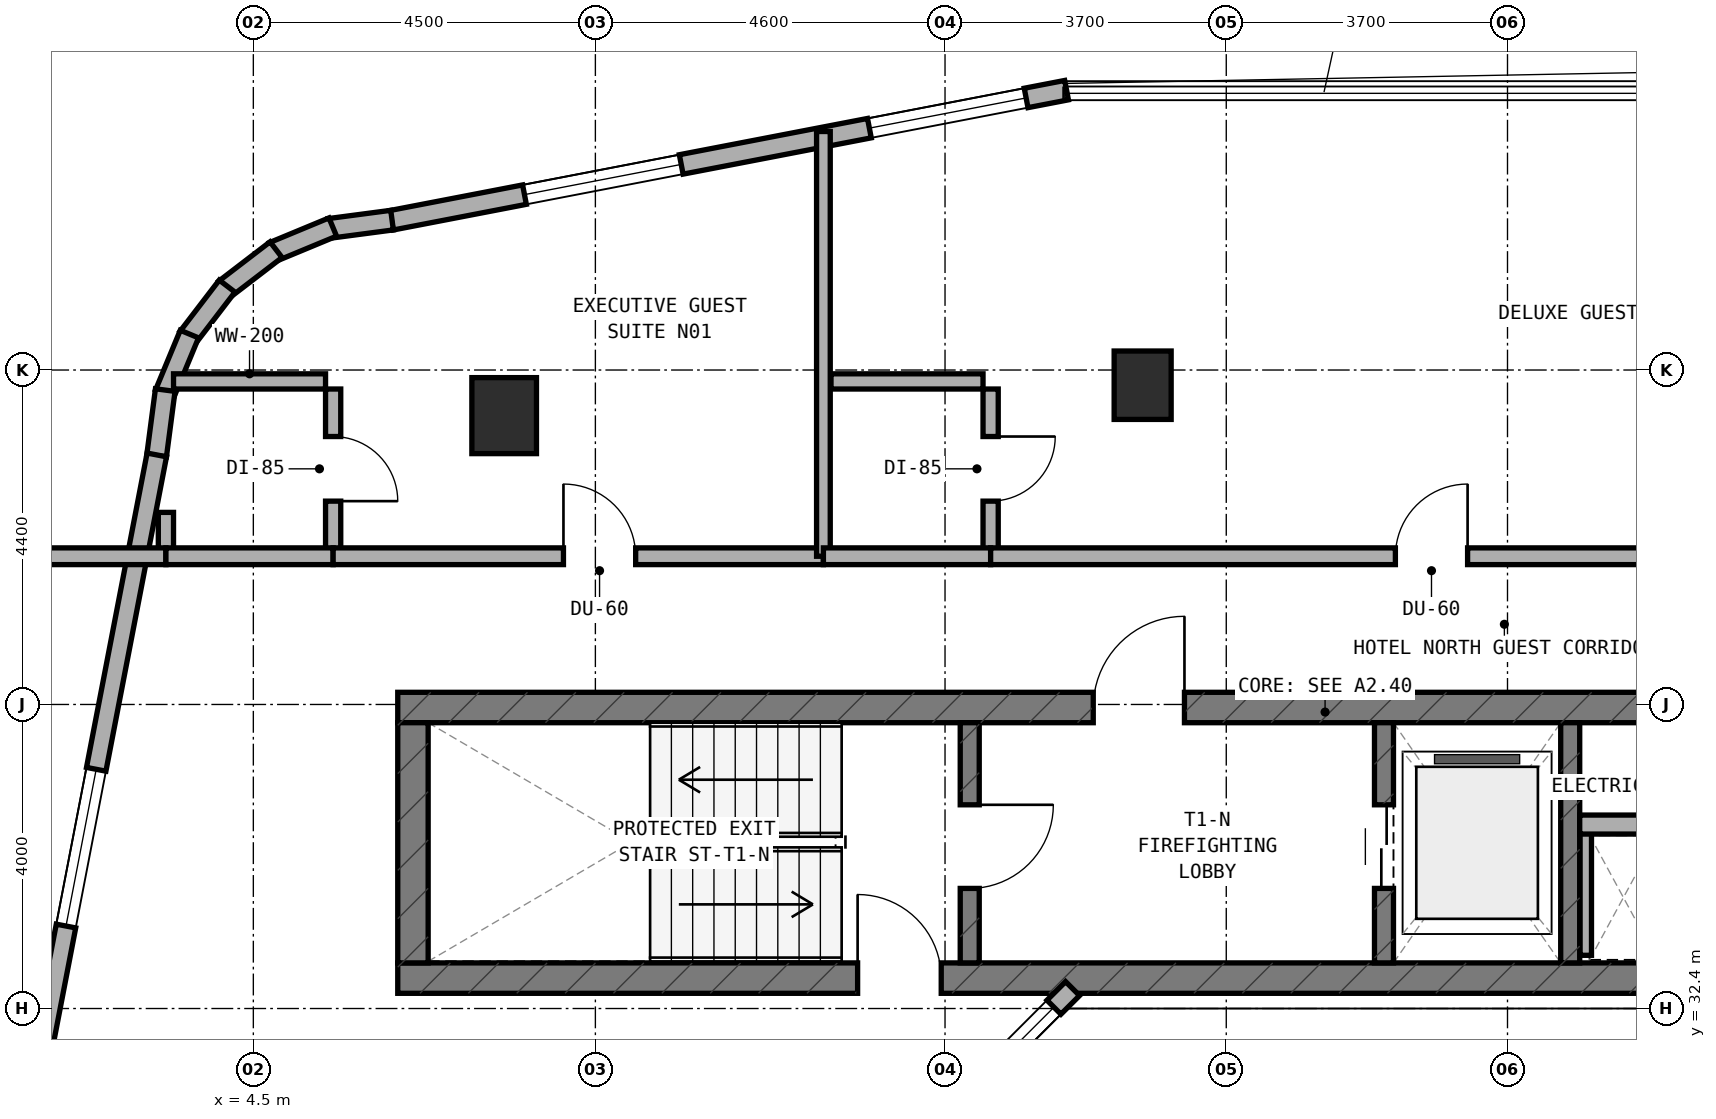
"""IFC4 building model, lengths in metres.
Left out: names, types, materials, properties, quantities, classifications, styles, units other than length and angle.
Written with IfcOpenShell. Run it as: python <this file> out.ifc"""

import sys

from ifc_helpers import new_model, si_unit, direction, frame, frame_2d, origin, origin_2d, place, context, subcontext, project, spatial, rectangle, extrude, element, fill, save


model = new_model("IFC4")
c1 = context("Model", 3, precision=1e-05, world=origin(), true_north=direction((0.0, 1.0)))
c2 = subcontext(c1, "Body", "Model", "MODEL_VIEW")
j1 = project(units=[si_unit("LENGTHUNIT", "METRE"), si_unit("PLANEANGLEUNIT", "RADIAN")], contexts=[c1])
p1 = place(None, origin())
s1 = spatial("IfcSite", under=j1, at=p1, CompositionType="ELEMENT")
p2 = place(p1, origin())
s2 = spatial("IfcBuilding", under=s1, at=p2, CompositionType="ELEMENT")
p3 = place(p2, frame((0.0, 0.0, 177.5)))
s3 = spatial("IfcBuildingStorey", under=s2, at=p3, CompositionType="ELEMENT", Elevation=177.5)
p4 = place(p3, frame((6.4, 32.8, 0.0), z_axis=(0.0, 0.0, 1.0), x_axis=(1.0, 0.0, 0.0)))
e1 = element("IfcWall", 1, at=p4, inside=s3, PredefinedType="SHEAR", context=c2, shape_type="SweptSolid", body=[
    extrude(rectangle(XDim=24.4, YDim=0.4, at=frame_2d((12.2, 0.0))), origin(), (0.0, 0.0, 1.0), 3.6),
])
p5 = place(p4, frame((6.05, 0.0, 0.0)))
e2 = element("IfcOpeningElement", 2, at=p5, cuts=e1, PredefinedType="OPENING", context=c2, shape_type="SweptSolid", body=[
    extrude(rectangle(XDim=1.1, YDim=2.15, at=frame_2d((0.55, 1.075))), frame((0.0, 0.21, 0.0), z_axis=(0.0, -1.0, 0.0), x_axis=(1.0, 0.0, 0.0)), (0.0, 0.0, 1.0), 0.42),
])
p6 = place(p3, frame((6.4, 36.36, 0.0), z_axis=(0.0, 0.0, 1.0), x_axis=(1.0, 0.0, 0.0)))
e3 = element("IfcWall", 3, at=p6, inside=s3, PredefinedType="SHEAR", context=c2, shape_type="SweptSolid", body=[
    extrude(rectangle(XDim=24.4, YDim=0.4, at=frame_2d((12.2, 0.0))), origin(), (0.0, 0.0, 1.0), 3.6),
])
p7 = place(p6, frame((9.15, 0.0, 0.0)))
e4 = element("IfcOpeningElement", 4, at=p7, cuts=e3, PredefinedType="OPENING", context=c2, shape_type="SweptSolid", body=[
    extrude(rectangle(XDim=1.2, YDim=2.15, at=frame_2d((0.6, 1.075))), frame((0.0, 0.21, 0.0), z_axis=(0.0, -1.0, 0.0), x_axis=(1.0, 0.0, 0.0)), (0.0, 0.0, 1.0), 0.42),
])
p8 = place(p6, frame((19.2, 0.0, 0.0)))
e5 = element("IfcOpeningElement", 5, at=p8, cuts=e3, PredefinedType="OPENING", context=c2, shape_type="SweptSolid", body=[
    extrude(rectangle(XDim=0.85, YDim=2.1, at=frame_2d((0.425, 1.05))), frame((0.0, 0.21, 0.0), z_axis=(0.0, -1.0, 0.0), x_axis=(1.0, 0.0, 0.0)), (0.0, 0.0, 1.0), 0.42),
])
p9 = place(p6, frame((16.94, 0.0, 0.0)))
e6 = element("IfcOpeningElement", 6, at=p9, cuts=e3, PredefinedType="OPENING", context=c2, shape_type="SweptSolid", body=[
    extrude(rectangle(XDim=0.85, YDim=2.1, at=frame_2d((0.425, 1.05))), frame((0.0, 0.21, 0.0), z_axis=(0.0, -1.0, 0.0), x_axis=(1.0, 0.0, 0.0)), (0.0, 0.0, 1.0), 0.42),
])
p10 = place(p3, frame((6.6, 33.0, 0.0), z_axis=(0.0, 0.0, 1.0), x_axis=(0.0, 1.0, 0.0)))
e7 = element("IfcWall", 7, at=p10, inside=s3, PredefinedType="SHEAR", context=c2, shape_type="SweptSolid", body=[
    extrude(rectangle(XDim=3.16, YDim=0.4, at=frame_2d((1.58, 0.0))), origin(), (0.0, 0.0, 1.0), 3.6),
])
p11 = place(p3, frame((13.925, 33.0, 0.0), z_axis=(0.0, 0.0, 1.0), x_axis=(0.0, 1.0, 0.0)))
e8 = element("IfcWall", 8, at=p11, inside=s3, PredefinedType="STANDARD", context=c2, shape_type="SweptSolid", body=[
    extrude(rectangle(XDim=3.16, YDim=0.25, at=frame_2d((1.58, 0.0))), origin(), (0.0, 0.0, 1.0), 3.32),
])
p12 = place(p11, frame((0.98, 0.0, 0.0)))
e9 = element("IfcOpeningElement", 9, at=p12, cuts=e8, PredefinedType="OPENING", context=c2, shape_type="SweptSolid", body=[
    extrude(rectangle(XDim=1.1, YDim=2.15, at=frame_2d((0.55, 1.075))), frame((0.0, 0.135, 0.0), z_axis=(0.0, -1.0, 0.0), x_axis=(1.0, 0.0, 0.0)), (0.0, 0.0, 1.0), 0.27),
])
p13 = place(p3, frame((19.375, 33.0, 0.0), z_axis=(0.0, 0.0, 1.0), x_axis=(0.0, 1.0, 0.0)))
e10 = element("IfcWall", 10, at=p13, inside=s3, PredefinedType="STANDARD", context=c2, shape_type="SweptSolid", body=[
    extrude(rectangle(XDim=3.16, YDim=0.25, at=frame_2d((1.58, 0.0))), origin(), (0.0, 0.0, 1.0), 3.32),
])
p14 = place(p13, frame((0.98, 0.0, 0.0)))
e11 = element("IfcOpeningElement", 11, at=p14, cuts=e10, PredefinedType="OPENING", context=c2, shape_type="SweptSolid", body=[
    extrude(rectangle(XDim=1.1, YDim=2.15, at=frame_2d((0.55, 1.075))), frame((0.0, 0.135, 0.0), z_axis=(0.0, -1.0, 0.0), x_axis=(1.0, 0.0, 0.0)), (0.0, 0.0, 1.0), 0.27),
])
p15 = place(p3, frame((21.825, 33.0, 0.0), z_axis=(0.0, 0.0, 1.0), x_axis=(0.0, 1.0, 0.0)))
e12 = element("IfcWall", 12, at=p15, inside=s3, PredefinedType="STANDARD", context=c2, shape_type="SweptSolid", body=[
    extrude(rectangle(XDim=3.16, YDim=0.25, at=frame_2d((1.58, 0.0))), origin(), (0.0, 0.0, 1.0), 3.32),
])
p16 = place(p3, frame((16.2, 40.6, 0.0), z_axis=(0.0, 0.0, 1.0), x_axis=(1.0, 0.0, 0.0)))
e13 = element("IfcColumn", 13, at=p16, inside=s3, PredefinedType="COLUMN", context=c2, shape_type="SweptSolid", body=[
    extrude(rectangle(XDim=0.75, YDim=0.9, at=origin_2d()), origin(), (0.0, 0.0, 1.0), 3.6),
])
p17 = place(p3, frame((7.8, 40.2, 0.0), z_axis=(0.0, 0.0, 1.0), x_axis=(1.0, 0.0, 0.0)))
e14 = element("IfcColumn", 14, at=p17, inside=s3, PredefinedType="COLUMN", context=c2, shape_type="SweptSolid", body=[
    extrude(rectangle(XDim=0.85, YDim=1.0, at=origin_2d()), origin(), (0.0, 0.0, 1.0), 3.6),
])
p18 = place(p3, frame((13.515, 30.899, 0.0), z_axis=(0.0, 0.0, 1.0), x_axis=(0.707106781187, 0.707106781187, 0.0)))
e15 = element("IfcWall", 15, at=p18, inside=s3, PredefinedType="STANDARD", context=c2, shape_type="SweptSolid", body=[
    extrude(rectangle(XDim=2.493, YDim=0.26, at=frame_2d((1.247, 0.0))), origin(), (0.0, 0.0, 1.0), 3.32),
])
p19 = place(p18, frame((0.347, 0.0, 0.85)))
e16 = element("IfcOpeningElement", 16, at=p19, cuts=e15, PredefinedType="OPENING", context=c2, shape_type="SweptSolid", body=[
    extrude(rectangle(XDim=1.8, YDim=1.5, at=frame_2d((0.9, 0.75))), frame((0.0, 0.14, 0.0), z_axis=(0.0, -1.0, 0.0), x_axis=(1.0, 0.0, 0.0)), (0.0, 0.0, 1.0), 0.28),
])
p20 = place(p3, frame((15.199, 44.482, 0.0), z_axis=(0.0, 0.0, 1.0), x_axis=(-0.98192801022, -0.189254809039, 0.0)))
e17 = element("IfcWall", 17, at=p20, inside=s3, PredefinedType="STANDARD", context=c2, shape_type="SweptSolid", body=[
    extrude(rectangle(XDim=9.046, YDim=0.26, at=frame_2d((4.523, 0.0))), origin(), (0.0, 0.0, 1.0), 3.32),
])
p21 = place(p20, frame((0.542, 0.0, 0.85)))
e18 = element("IfcOpeningElement", 18, at=p21, cuts=e17, PredefinedType="OPENING", context=c2, shape_type="SweptSolid", body=[
    extrude(rectangle(XDim=2.1, YDim=1.5, at=frame_2d((1.05, 0.75))), frame((0.0, 0.14, 0.0), z_axis=(0.0, -1.0, 0.0), x_axis=(1.0, 0.0, 0.0)), (0.0, 0.0, 1.0), 0.28),
])
p22 = place(p20, frame((5.163, 0.0, 0.85)))
e19 = element("IfcOpeningElement", 19, at=p22, cuts=e17, PredefinedType="OPENING", context=c2, shape_type="SweptSolid", body=[
    extrude(rectangle(XDim=2.1, YDim=1.5, at=frame_2d((1.05, 0.75))), frame((0.0, 0.14, 0.0), z_axis=(0.0, -1.0, 0.0), x_axis=(1.0, 0.0, 0.0)), (0.0, 0.0, 1.0), 0.28),
])
p23 = place(p3, frame((6.325, 42.772, 0.0), z_axis=(0.0, 0.0, 1.0), x_axis=(-0.99142134712, -0.130704676564, 0.0)))
e20 = element("IfcWall", 20, at=p23, inside=s3, PredefinedType="STANDARD", context=c2, shape_type="SweptSolid", body=[
    extrude(rectangle(XDim=0.833, YDim=0.26, at=frame_2d((0.417, 0.0))), origin(), (0.0, 0.0, 1.0), 3.32),
])
p24 = place(p3, frame((5.545, 42.681, 0.0), z_axis=(0.0, 0.0, 1.0), x_axis=(-0.923712395518, -0.383086687796, 0.0)))
e21 = element("IfcWall", 21, at=p24, inside=s3, PredefinedType="STANDARD", context=c2, shape_type="SweptSolid", body=[
    extrude(rectangle(XDim=0.851, YDim=0.26, at=frame_2d((0.425, 0.0))), origin(), (0.0, 0.0, 1.0), 3.32),
])
for number, where, z_axis, x_axis in (
    (22, (4.799, 42.383, 0.0), (0.0, 0.0, 1.0), (-0.794, -0.608, 0.0)),
    (23, (4.155, 41.904, 0.0), (0.0, 0.0, 1.0), (-0.608, -0.794, 0.0)),
):
    element("IfcWall", number, at=place(p3, frame(where, z_axis=z_axis, x_axis=x_axis)), inside=s3, PredefinedType="STANDARD", context=c2, shape_type="SweptSolid", body=[
        extrude(rectangle(XDim=0.85, YDim=0.26, at=frame_2d((0.425, 0.0))), origin(), (0.0, 0.0, 1.0), 3.32),
    ])
p25 = place(p3, frame((3.659, 41.273, 0.0), z_axis=(0.0, 0.0, 1.0), x_axis=(-0.383086687796, -0.923712395518, 0.0)))
e24 = element("IfcWall", 24, at=p25, inside=s3, PredefinedType="STANDARD", context=c2, shape_type="SweptSolid", body=[
    extrude(rectangle(XDim=0.851, YDim=0.26, at=frame_2d((0.425, 0.0))), origin(), (0.0, 0.0, 1.0), 3.32),
])
p26 = place(p3, frame((3.341, 40.536, 0.0), z_axis=(0.0, 0.0, 1.0), x_axis=(-0.130192647656, -0.991488716273, 0.0)))
e25 = element("IfcWall", 25, at=p26, inside=s3, PredefinedType="STANDARD", context=c2, shape_type="SweptSolid", body=[
    extrude(rectangle(XDim=0.868, YDim=0.26, at=frame_2d((0.434, 0.0))), origin(), (0.0, 0.0, 1.0), 3.32),
])
p27 = place(p3, frame((3.23, 39.683, 0.0), z_axis=(0.0, 0.0, 1.0), x_axis=(-0.189254809039, -0.98192801022, 0.0)))
e26 = element("IfcWall", 26, at=p27, inside=s3, PredefinedType="STANDARD", context=c2, shape_type="SweptSolid", body=[
    extrude(rectangle(XDim=9.046, YDim=0.26, at=frame_2d((4.523, 0.0))), origin(), (0.0, 0.0, 1.0), 3.32),
])
p28 = place(p27, frame((4.212, 0.0, 0.85)))
e27 = element("IfcOpeningElement", 27, at=p28, cuts=e26, PredefinedType="OPENING", context=c2, shape_type="SweptSolid", body=[
    extrude(rectangle(XDim=2.1, YDim=1.5, at=frame_2d((1.05, 0.75))), frame((0.0, 0.14, 0.0), z_axis=(0.0, -1.0, 0.0), x_axis=(1.0, 0.0, 0.0)), (0.0, 0.0, 1.0), 0.28),
])
p29 = place(p3, frame((22.03, 33.1, 0.0), z_axis=(0.0, 0.0, 1.0), x_axis=(0.0, 1.0, 0.0)))
e28 = element("IfcWall", 28, at=p29, inside=s3, PredefinedType="PARTITIONING", context=c2, shape_type="SweptSolid", body=[
    extrude(rectangle(XDim=1.62, YDim=0.15, at=frame_2d((0.81, 0.0))), origin(), (0.0, 0.0, 1.0), 3.32),
])
p30 = place(p3, frame((21.95, 34.82, 0.0), z_axis=(0.0, 0.0, 1.0), x_axis=(1.0, 0.0, 0.0)))
e29 = element("IfcWall", 29, at=p30, inside=s3, PredefinedType="SOLIDWALL", context=c2, shape_type="SweptSolid", body=[
    extrude(rectangle(XDim=1.15, YDim=0.25, at=frame_2d((0.575, 0.0))), origin(), (0.0, 0.0, 1.0), 3.32),
])
p31 = place(p3, frame((5.55, 38.45, 0.0), z_axis=(0.0, 0.0, 1.0), x_axis=(0.0, 1.0, 0.0)))
e30 = element("IfcWall", 30, at=p31, inside=s3, PredefinedType="PLUMBINGWALL", context=c2, shape_type="SweptSolid", body=[
    extrude(rectangle(XDim=2.1, YDim=0.2, at=frame_2d((1.05, 0.0))), origin(), (0.0, 0.0, 1.0), 3.32),
])
p32 = place(p31, frame((0.625, 0.0, 0.0)))
e31 = element("IfcOpeningElement", 31, at=p32, cuts=e30, PredefinedType="OPENING", context=c2, shape_type="SweptSolid", body=[
    extrude(rectangle(XDim=0.85, YDim=2.1, at=frame_2d((0.425, 1.05))), frame((0.0, 0.11, 0.0), z_axis=(0.0, -1.0, 0.0), x_axis=(1.0, 0.0, 0.0)), (0.0, 0.0, 1.0), 0.22),
])
p33 = place(p3, frame((3.45, 40.65, 0.0), z_axis=(0.0, 0.0, 1.0), x_axis=(1.0, 0.0, 0.0)))
e32 = element("IfcWall", 32, at=p33, inside=s3, PredefinedType="PLUMBINGWALL", context=c2, shape_type="SweptSolid", body=[
    extrude(rectangle(XDim=2.0, YDim=0.2, at=frame_2d((1.0, 0.0))), origin(), (0.0, 0.0, 1.0), 3.32),
])
p34 = place(p3, frame((3.35, 38.35, 0.0), z_axis=(0.0, 0.0, 1.0), x_axis=(0.0, 1.0, 0.0)))
e33 = element("IfcWall", 33, at=p34, inside=s3, PredefinedType="PLUMBINGWALL", context=c2, shape_type="SweptSolid", body=[
    extrude(rectangle(XDim=0.577, YDim=0.2, at=frame_2d((0.289, 0.0))), origin(), (0.0, 0.0, 1.0), 3.32),
])
p35 = place(p3, frame((1.56, 38.35, 0.0), z_axis=(0.0, 0.0, 1.0), x_axis=(1.0, 0.0, 0.0)))
e34 = element("IfcWall", 34, at=p35, inside=s3, PredefinedType="SOLIDWALL", context=c2, shape_type="SweptSolid", body=[
    extrude(rectangle(XDim=1.79, YDim=0.22, at=frame_2d((0.895, 0.0))), origin(), (0.0, 0.0, 1.0), 3.32),
])
p36 = place(p3, frame((3.35, 38.35, 0.0), z_axis=(0.0, 0.0, 1.0), x_axis=(1.0, 0.0, 0.0)))
e35 = element("IfcWall", 35, at=p36, inside=s3, PredefinedType="SOLIDWALL", context=c2, shape_type="SweptSolid", body=[
    extrude(rectangle(XDim=2.2, YDim=0.22, at=frame_2d((1.1, 0.0))), origin(), (0.0, 0.0, 1.0), 3.32),
])
p37 = place(p3, frame((5.55, 38.35, 0.0), z_axis=(0.0, 0.0, 1.0), x_axis=(1.0, 0.0, 0.0)))
e36 = element("IfcWall", 36, at=p37, inside=s3, PredefinedType="SOLIDWALL", context=c2, shape_type="SweptSolid", body=[
    extrude(rectangle(XDim=6.45, YDim=0.22, at=frame_2d((3.225, 0.0))), origin(), (0.0, 0.0, 1.0), 2.995),
])
p38 = place(p37, frame((3.03, 0.0, 0.0)))
e37 = element("IfcOpeningElement", 37, at=p38, cuts=e36, PredefinedType="OPENING", context=c2, shape_type="SweptSolid", body=[
    extrude(rectangle(XDim=0.95, YDim=2.1, at=frame_2d((0.475, 1.05))), frame((0.0, 0.12, 0.0), z_axis=(0.0, -1.0, 0.0), x_axis=(1.0, 0.0, 0.0)), (0.0, 0.0, 1.0), 0.24),
])
p39 = place(p3, frame((12.0, 38.35, 0.0), z_axis=(0.0, 0.0, 1.0), x_axis=(0.0, 1.0, 0.0)))
e38 = element("IfcWall", 38, at=p39, inside=s3, PredefinedType="SOLIDWALL", context=c2, shape_type="SweptSolid", body=[
    extrude(rectangle(XDim=5.588, YDim=0.18, at=frame_2d((2.794, 0.0))), origin(), (0.0, 0.0, 1.0), 2.845),
])
p40 = place(p3, frame((14.2, 38.45, 0.0), z_axis=(0.0, 0.0, 1.0), x_axis=(0.0, 1.0, 0.0)))
e39 = element("IfcWall", 39, at=p40, inside=s3, PredefinedType="PLUMBINGWALL", context=c2, shape_type="SweptSolid", body=[
    extrude(rectangle(XDim=2.1, YDim=0.2, at=frame_2d((1.05, 0.0))), origin(), (0.0, 0.0, 1.0), 2.845),
])
p41 = place(p40, frame((0.625, 0.0, 0.0)))
e40 = element("IfcOpeningElement", 40, at=p41, cuts=e39, PredefinedType="OPENING", context=c2, shape_type="SweptSolid", body=[
    extrude(rectangle(XDim=0.85, YDim=2.1, at=frame_2d((0.425, 1.05))), frame((0.0, 0.11, 0.0), z_axis=(0.0, -1.0, 0.0), x_axis=(1.0, 0.0, 0.0)), (0.0, 0.0, 1.0), 0.22),
])
p42 = place(p3, frame((12.1, 40.65, 0.0), z_axis=(0.0, 0.0, 1.0), x_axis=(1.0, 0.0, 0.0)))
e41 = element("IfcWall", 41, at=p42, inside=s3, PredefinedType="PLUMBINGWALL", context=c2, shape_type="SweptSolid", body=[
    extrude(rectangle(XDim=2.0, YDim=0.2, at=frame_2d((1.0, 0.0))), origin(), (0.0, 0.0, 1.0), 2.935),
])
p43 = place(p3, frame((12.0, 38.35, 0.0), z_axis=(0.0, 0.0, 1.0), x_axis=(1.0, 0.0, 0.0)))
e42 = element("IfcWall", 42, at=p43, inside=s3, PredefinedType="SOLIDWALL", context=c2, shape_type="SweptSolid", body=[
    extrude(rectangle(XDim=2.2, YDim=0.22, at=frame_2d((1.1, 0.0))), origin(), (0.0, 0.0, 1.0), 3.32),
])
p44 = place(p3, frame((14.2, 38.35, 0.0), z_axis=(0.0, 0.0, 1.0), x_axis=(1.0, 0.0, 0.0)))
e43 = element("IfcWall", 43, at=p44, inside=s3, PredefinedType="SOLIDWALL", context=c2, shape_type="SweptSolid", body=[
    extrude(rectangle(XDim=11.6, YDim=0.22, at=frame_2d((5.8, 0.0))), origin(), (0.0, 0.0, 1.0), 2.995),
])
p45 = place(p44, frame((5.325, 0.0, 0.0)))
e44 = element("IfcOpeningElement", 44, at=p45, cuts=e43, PredefinedType="OPENING", context=c2, shape_type="SweptSolid", body=[
    extrude(rectangle(XDim=0.95, YDim=2.1, at=frame_2d((0.475, 1.05))), frame((0.0, 0.12, 0.0), z_axis=(0.0, -1.0, 0.0), x_axis=(1.0, 0.0, 0.0)), (0.0, 0.0, 1.0), 0.24),
])
p46 = place(p19, origin())
e45 = element("IfcWindow", 45, at=p46, inside=s3, PartitioningType="SINGLE_PANEL", PredefinedType="WINDOW", context=c2, shape_type="SweptSolid", body=[
    extrude(rectangle(XDim=1.8, YDim=1.5, at=frame_2d((0.9, 0.75))), frame((0.0, 0.03, 0.0), z_axis=(0.0, -1.0, 0.0), x_axis=(1.0, 0.0, 0.0)), (0.0, 0.0, 1.0), 0.06),
])
fill(e16, e45)
p47 = place(p21, origin())
e46 = element("IfcWindow", 46, at=p47, inside=s3, PartitioningType="SINGLE_PANEL", PredefinedType="WINDOW", context=c2, shape_type="SweptSolid", body=[
    extrude(rectangle(XDim=2.1, YDim=1.5, at=frame_2d((1.05, 0.75))), frame((0.0, 0.03, 0.0), z_axis=(0.0, -1.0, 0.0), x_axis=(1.0, 0.0, 0.0)), (0.0, 0.0, 1.0), 0.06),
])
fill(e18, e46)
p48 = place(p22, origin())
e47 = element("IfcWindow", 47, at=p48, inside=s3, PartitioningType="SINGLE_PANEL", PredefinedType="WINDOW", context=c2, shape_type="SweptSolid", body=[
    extrude(rectangle(XDim=2.1, YDim=1.5, at=frame_2d((1.05, 0.75))), frame((0.0, 0.03, 0.0), z_axis=(0.0, -1.0, 0.0), x_axis=(1.0, 0.0, 0.0)), (0.0, 0.0, 1.0), 0.06),
])
fill(e19, e47)
p49 = place(p28, origin())
e48 = element("IfcWindow", 48, at=p49, inside=s3, PartitioningType="SINGLE_PANEL", PredefinedType="WINDOW", context=c2, shape_type="SweptSolid", body=[
    extrude(rectangle(XDim=2.1, YDim=1.5, at=frame_2d((1.05, 0.75))), frame((0.0, 0.03, 0.0), z_axis=(0.0, -1.0, 0.0), x_axis=(1.0, 0.0, 0.0)), (0.0, 0.0, 1.0), 0.06),
])
fill(e27, e48)
p50 = place(p12, frame((1.1, 0.0, 0.0), z_axis=(0.0, 0.0, 1.0), x_axis=(-1.0, 0.0, 0.0)))
e49 = element("IfcDoor", 49, at=p50, inside=s3, OperationType="SINGLE_SWING_LEFT", PredefinedType="DOOR", context=c2, shape_type="SweptSolid", body=[
    extrude(rectangle(XDim=1.1, YDim=2.15, at=frame_2d((0.55, 1.075))), frame((0.0, 0.025, 0.0), z_axis=(0.0, -1.0, 0.0), x_axis=(1.0, 0.0, 0.0)), (0.0, 0.0, 1.0), 0.05),
])
fill(e9, e49)
p51 = place(p7, origin())
e50 = element("IfcDoor", 50, at=p51, inside=s3, OperationType="SINGLE_SWING_RIGHT", PredefinedType="DOOR", context=c2, shape_type="SweptSolid", body=[
    extrude(rectangle(XDim=1.2, YDim=2.15, at=frame_2d((0.6, 1.075))), frame((0.0, 0.025, 0.0), z_axis=(0.0, -1.0, 0.0), x_axis=(1.0, 0.0, 0.0)), (0.0, 0.0, 1.0), 0.05),
])
fill(e4, e50)
p52 = place(p14, origin())
e51 = element("IfcDoor", 51, at=p52, inside=s3, OperationType="DOUBLE_DOOR_SLIDING", PredefinedType="DOOR", context=c2, shape_type="SweptSolid", body=[
    extrude(rectangle(XDim=1.1, YDim=2.15, at=frame_2d((0.55, 1.075))), frame((0.0, 0.025, 0.0), z_axis=(0.0, -1.0, 0.0), x_axis=(1.0, 0.0, 0.0)), (0.0, 0.0, 1.0), 0.05),
])
fill(e11, e51)
p53 = place(p5, origin())
e52 = element("IfcDoor", 52, at=p53, inside=s3, OperationType="SINGLE_SWING_LEFT", PredefinedType="DOOR", context=c2, shape_type="SweptSolid", body=[
    extrude(rectangle(XDim=1.1, YDim=2.15, at=frame_2d((0.55, 1.075))), frame((0.0, 0.025, 0.0), z_axis=(0.0, -1.0, 0.0), x_axis=(1.0, 0.0, 0.0)), (0.0, 0.0, 1.0), 0.05),
])
fill(e2, e52)
p54 = place(p32, frame((0.85, 0.0, 0.0), z_axis=(0.0, 0.0, 1.0), x_axis=(-1.0, 0.0, 0.0)))
e53 = element("IfcDoor", 53, at=p54, inside=s3, OperationType="SINGLE_SWING_RIGHT", PredefinedType="DOOR", context=c2, shape_type="SweptSolid", body=[
    extrude(rectangle(XDim=0.85, YDim=2.1, at=frame_2d((0.425, 1.05))), frame((0.0, 0.025, 0.0), z_axis=(0.0, -1.0, 0.0), x_axis=(1.0, 0.0, 0.0)), (0.0, 0.0, 1.0), 0.05),
])
fill(e31, e53)
p55 = place(p38, origin())
e54 = element("IfcDoor", 54, at=p55, inside=s3, OperationType="SINGLE_SWING_LEFT", PredefinedType="DOOR", context=c2, shape_type="SweptSolid", body=[
    extrude(rectangle(XDim=0.95, YDim=2.1, at=frame_2d((0.475, 1.05))), frame((0.0, 0.025, 0.0), z_axis=(0.0, -1.0, 0.0), x_axis=(1.0, 0.0, 0.0)), (0.0, 0.0, 1.0), 0.05),
])
fill(e37, e54)
p56 = place(p41, frame((0.85, 0.0, 0.0), z_axis=(0.0, 0.0, 1.0), x_axis=(-1.0, 0.0, 0.0)))
e55 = element("IfcDoor", 55, at=p56, inside=s3, OperationType="SINGLE_SWING_LEFT", PredefinedType="DOOR", context=c2, shape_type="SweptSolid", body=[
    extrude(rectangle(XDim=0.85, YDim=2.1, at=frame_2d((0.425, 1.05))), frame((0.0, 0.025, 0.0), z_axis=(0.0, -1.0, 0.0), x_axis=(1.0, 0.0, 0.0)), (0.0, 0.0, 1.0), 0.05),
])
fill(e40, e55)
p57 = place(p45, origin())
e56 = element("IfcDoor", 56, at=p57, inside=s3, OperationType="SINGLE_SWING_RIGHT", PredefinedType="DOOR", context=c2, shape_type="SweptSolid", body=[
    extrude(rectangle(XDim=0.95, YDim=2.1, at=frame_2d((0.475, 1.05))), frame((0.0, 0.025, 0.0), z_axis=(0.0, -1.0, 0.0), x_axis=(1.0, 0.0, 0.0)), (0.0, 0.0, 1.0), 0.05),
])
fill(e44, e56)
save(model, sys.argv[1])
